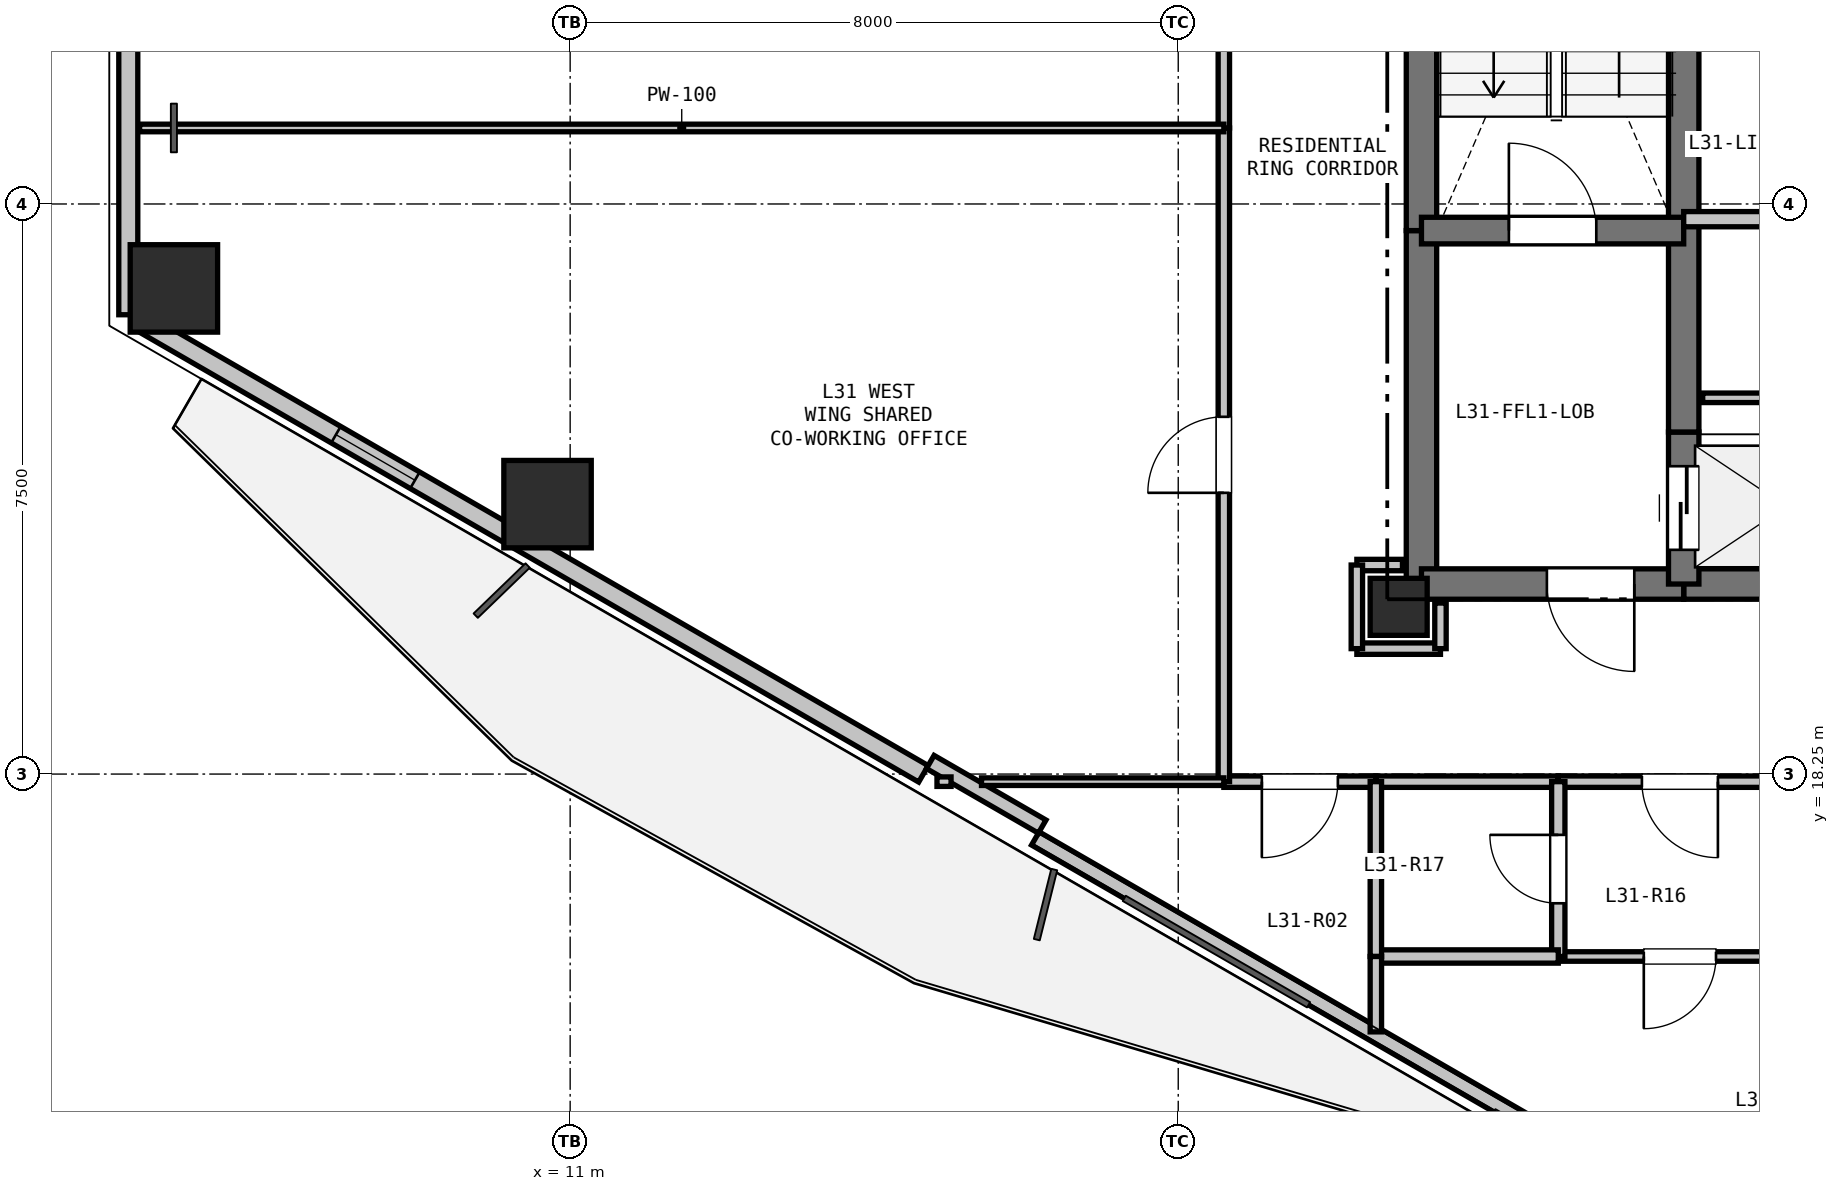
"""IFC4 building model, lengths in metres.
Left out: names, types, materials, properties, quantities, classifications, styles, units other than length and angle.
Written with IfcOpenShell. Run it as: python <this file> out.ifc"""

import sys

from ifc_helpers import new_model, si_unit, direction, frame, frame_2d, origin, origin_2d, place, context, subcontext, project, spatial, rectangle, hollow_rectangle, extrude, element, fill, save


model = new_model("IFC4")
c1 = context("Model", 3, precision=1e-05, world=origin(), true_north=direction((0.0, 1.0)))
c2 = subcontext(c1, "Body", "Model", "MODEL_VIEW")
j1 = project(units=[si_unit("LENGTHUNIT", "METRE"), si_unit("PLANEANGLEUNIT", "RADIAN")], contexts=[c1])
p1 = place(None, origin())
s1 = spatial("IfcSite", under=j1, at=p1, CompositionType="ELEMENT")
p2 = place(p1, origin())
s2 = spatial("IfcBuilding", under=s1, at=p2, CompositionType="ELEMENT")
p3 = place(p2, frame((0.0, 0.0, 113.1)))
s3 = spatial("IfcBuildingStorey", under=s2, at=p3, CompositionType="ELEMENT", Elevation=113.1)
p4 = place(p3, frame((21.9, 20.45, 0.0), z_axis=(0.0, 0.0, 1.0), x_axis=(1.0, 0.0, 0.0)))
e1 = element("IfcColumn", 1, at=p4, inside=s3, PredefinedType="COLUMN", context=c2, shape_type="SweptSolid", body=[
    extrude(rectangle(XDim=0.75, YDim=0.75, at=origin_2d()), origin(), (0.0, 0.0, 1.0), 3.3),
])
for number, where, z_axis, x_axis in (
    (2, (10.702, 21.801, 0.0), (0.0, 0.0, 1.0), (1.0, 0.0, 0.0)),
    (3, (5.787, 24.639, 0.0), (0.0, 0.0, 1.0), (1.0, 0.0, 0.0)),
):
    element("IfcColumn", number, at=place(p3, frame(where, z_axis=z_axis, x_axis=x_axis)), inside=s3, PredefinedType="COLUMN", context=c2, shape_type="SweptSolid", body=[
        extrude(hollow_rectangle(XDim=1.15, YDim=1.15, WallThickness=0.032, at=origin_2d()), origin(), (0.0, 0.0, 1.0), 3.3),
    ])
p5 = place(p3, frame((5.187, 24.293, 0.0), z_axis=(0.0, 0.0, 1.0), x_axis=(0.0, 1.0, 0.0)))
e4 = element("IfcWall", 4, at=p5, inside=s3, PredefinedType="SOLIDWALL", context=c2, shape_type="SweptSolid", body=[
    extrude(rectangle(XDim=4.915, YDim=0.25, at=frame_2d((2.457, 0.0))), origin(), (0.0, 0.0, 1.0), 2.64),
])
p6 = place(p3, frame((26.845, 11.788, 0.0), z_axis=(0.0, 0.0, 1.0), x_axis=(-0.866027010039, 0.499997217876, 0.0)))
e5 = element("IfcWall", 5, at=p6, inside=s3, PredefinedType="PARAPET", context=c2, shape_type="SweptSolid", body=[
    extrude(rectangle(XDim=11.229, YDim=0.2, at=frame_2d((5.615, 0.0))), origin(), (0.0, 0.0, 1.0), 0.2),
])
p7 = place(p3, frame((15.648, 18.253, 0.0), z_axis=(0.0, 0.0, 1.0), x_axis=(-0.866023023012, 0.500004123596, 0.0)))
e6 = element("IfcWall", 6, at=p7, inside=s3, PredefinedType="SOLIDWALL", context=c2, shape_type="SweptSolid", body=[
    extrude(rectangle(XDim=11.93, YDim=0.25, at=frame_2d((5.965, 0.0))), origin(), (0.0, 0.0, 1.0), 2.64),
])
p8 = place(p7, frame((7.725, 0.0, 0.9)))
e7 = element("IfcOpeningElement", 7, at=p8, cuts=e6, PredefinedType="OPENING", context=c2, shape_type="SweptSolid", body=[
    extrude(rectangle(XDim=1.2, YDim=1.5, at=frame_2d((0.6, 0.75))), frame((0.0, 0.135, 0.0), z_axis=(0.0, -1.0, 0.0), x_axis=(1.0, 0.0, 0.0)), (0.0, 0.0, 1.0), 0.27),
])
p9 = place(p3, frame((17.21, 17.559, 0.0), z_axis=(0.0, 0.0, 1.0), x_axis=(-0.866025371046, 0.500000056704, 0.0)))
e8 = element("IfcWall", 8, at=p9, inside=s3, PredefinedType="PARAPET", context=c2, shape_type="SweptSolid", body=[
    extrude(rectangle(XDim=1.7, YDim=0.2, at=frame_2d((0.85, 0.0))), origin(), (0.0, 0.0, 1.0), 2.64),
])
p10 = place(p3, frame((22.2, 20.75, 0.0), z_axis=(0.0, 0.0, 1.0), x_axis=(0.0, 1.0, 0.0)))
e9 = element("IfcWall", 9, at=p10, inside=s3, PredefinedType="SHEAR", context=c2, shape_type="SweptSolid", body=[
    extrude(rectangle(XDim=4.65, YDim=0.4, at=frame_2d((2.325, 0.0))), origin(), (0.0, 0.0, 1.0), 3.02),
])
p11 = place(p3, frame((22.2, 25.4, 0.0), z_axis=(0.0, 0.0, 1.0), x_axis=(0.0, 1.0, 0.0)))
e10 = element("IfcWall", 10, at=p11, inside=s3, PredefinedType="SHEAR", context=c2, shape_type="SweptSolid", body=[
    extrude(rectangle(XDim=7.35, YDim=0.4, at=frame_2d((3.675, 0.0))), origin(), (0.0, 0.0, 1.0), 3.02),
])
p12 = place(p3, frame((28.35, 20.75, 0.0), z_axis=(0.0, 0.0, 1.0), x_axis=(-1.0, 0.0, 0.0)))
e11 = element("IfcWall", 11, at=p12, inside=s3, PredefinedType="SHEAR", context=c2, shape_type="SweptSolid", body=[
    extrude(rectangle(XDim=2.7, YDim=0.4, at=frame_2d((1.35, 0.0))), origin(), (0.0, 0.0, 1.0), 3.02),
])
p13 = place(p3, frame((25.65, 20.75, 0.0), z_axis=(0.0, 0.0, 1.0), x_axis=(-1.0, 0.0, 0.0)))
e12 = element("IfcWall", 12, at=p13, inside=s3, PredefinedType="SHEAR", context=c2, shape_type="SweptSolid", body=[
    extrude(rectangle(XDim=3.45, YDim=0.4, at=frame_2d((1.725, 0.0))), origin(), (0.0, 0.0, 1.0), 3.02),
])
p14 = place(p13, frame((0.65, 0.0, 0.0)))
e13 = element("IfcOpeningElement", 13, at=p14, cuts=e12, PredefinedType="OPENING", context=c2, shape_type="SweptSolid", body=[
    extrude(rectangle(XDim=1.15, YDim=2.15, at=frame_2d((0.575, 1.075))), frame((0.0, 0.21, 0.0), z_axis=(0.0, -1.0, 0.0), x_axis=(1.0, 0.0, 0.0)), (0.0, 0.0, 1.0), 0.42),
])
p15 = place(p3, frame((25.65, 20.75, 0.0), z_axis=(0.0, 0.0, 1.0), x_axis=(0.0, 1.0, 0.0)))
e14 = element("IfcWall", 14, at=p15, inside=s3, PredefinedType="SHEAR", context=c2, shape_type="SweptSolid", body=[
    extrude(rectangle(XDim=2.0, YDim=0.4, at=frame_2d((1.0, 0.0))), origin(), (0.0, 0.0, 1.0), 3.02),
])
p16 = place(p15, frame((0.45, 0.0, 0.0)))
e15 = element("IfcOpeningElement", 15, at=p16, cuts=e14, PredefinedType="OPENING", context=c2, shape_type="SweptSolid", body=[
    extrude(rectangle(XDim=1.1, YDim=2.15, at=frame_2d((0.55, 1.075))), frame((0.0, 0.21, 0.0), z_axis=(0.0, -1.0, 0.0), x_axis=(1.0, 0.0, 0.0)), (0.0, 0.0, 1.0), 0.42),
])
p17 = place(p3, frame((25.65, 22.75, 0.0), z_axis=(0.0, 0.0, 1.0), x_axis=(0.0, 1.0, 0.0)))
e16 = element("IfcWall", 16, at=p17, inside=s3, PredefinedType="SHEAR", context=c2, shape_type="SweptSolid", body=[
    extrude(rectangle(XDim=2.8, YDim=0.4, at=frame_2d((1.4, 0.0))), origin(), (0.0, 0.0, 1.0), 3.02),
])
p18 = place(p3, frame((25.65, 25.55, 0.0), z_axis=(0.0, 0.0, 1.0), x_axis=(0.0, 1.0, 0.0)))
e17 = element("IfcWall", 17, at=p18, inside=s3, PredefinedType="SHEAR", context=c2, shape_type="SweptSolid", body=[
    extrude(rectangle(XDim=2.4, YDim=0.4, at=frame_2d((1.2, 0.0))), origin(), (0.0, 0.0, 1.0), 3.02),
])
p19 = place(p3, frame((22.2, 25.4, 0.0), z_axis=(0.0, 0.0, 1.0), x_axis=(1.0, 0.0, 0.0)))
e18 = element("IfcWall", 18, at=p19, inside=s3, PredefinedType="SHEAR", context=c2, shape_type="SweptSolid", body=[
    extrude(rectangle(XDim=3.45, YDim=0.35, at=frame_2d((1.725, 0.0))), origin(), (0.0, 0.0, 1.0), 3.02),
])
p20 = place(p19, frame((1.15, 0.0, 0.0)))
e19 = element("IfcOpeningElement", 19, at=p20, cuts=e18, PredefinedType="OPENING", context=c2, shape_type="SweptSolid", body=[
    extrude(rectangle(XDim=1.15, YDim=2.15, at=frame_2d((0.575, 1.075))), frame((0.0, 0.185, 0.0), z_axis=(0.0, -1.0, 0.0), x_axis=(1.0, 0.0, 0.0)), (0.0, 0.0, 1.0), 0.37),
])
p21 = place(p3, frame((25.65, 25.55, 0.0), z_axis=(0.0, 0.0, 1.0), x_axis=(1.0, 0.0, 0.0)))
e20 = element("IfcWall", 20, at=p21, inside=s3, PredefinedType="PARTITIONING", context=c2, shape_type="SweptSolid", body=[
    extrude(rectangle(XDim=4.95, YDim=0.2, at=frame_2d((2.475, 0.0))), origin(), (0.0, 0.0, 1.0), 3.02),
])
p22 = place(p3, frame((25.9, 23.2, 0.0), z_axis=(0.0, 0.0, 1.0), x_axis=(1.0, 0.0, 0.0)))
e21 = element("IfcWall", 21, at=p22, inside=s3, PredefinedType="PARTITIONING", context=c2, shape_type="SweptSolid", body=[
    extrude(rectangle(XDim=1.4, YDim=0.125, at=frame_2d((0.7, 0.0))), origin(), (0.0, 0.0, 1.0), 3.02),
])
p23 = place(p3, frame((21.35, 19.9, 0.0), z_axis=(0.0, 0.0, 1.0), x_axis=(1.0, 0.0, 0.0)))
e22 = element("IfcWall", 22, at=p23, inside=s3, PredefinedType="PARTITIONING", context=c2, shape_type="SweptSolid", body=[
    extrude(rectangle(XDim=1.1, YDim=0.15, at=frame_2d((0.55, 0.0))), origin(), (0.0, 0.0, 1.0), 2.393),
])
p24 = place(p3, frame((22.45, 19.9, 0.0), z_axis=(0.0, 0.0, 1.0), x_axis=(0.0, 1.0, 0.0)))
e23 = element("IfcWall", 23, at=p24, inside=s3, PredefinedType="PARTITIONING", context=c2, shape_type="SweptSolid", body=[
    extrude(rectangle(XDim=0.6, YDim=0.15, at=frame_2d((0.3, 0.0))), origin(), (0.0, 0.0, 1.0), 2.393),
])
p25 = place(p3, frame((27.2, 18.15, 0.0), z_axis=(0.0, 0.0, 1.0), x_axis=(-1.0, 0.0, 0.0)))
e24 = element("IfcWall", 24, at=p25, inside=s3, PredefinedType="PARTITIONING", context=c2, shape_type="SweptSolid", body=[
    extrude(rectangle(XDim=3.2, YDim=0.15, at=frame_2d((1.6, 0.0))), origin(), (0.0, 0.0, 1.0), 2.393),
])
p26 = place(p25, frame((1.1, 0.0, 0.0)))
e25 = element("IfcOpeningElement", 25, at=p26, cuts=e24, PredefinedType="OPENING", context=c2, shape_type="SweptSolid", body=[
    extrude(rectangle(XDim=1.0, YDim=2.15, at=frame_2d((0.5, 1.075))), frame((0.0, 0.085, 0.0), z_axis=(0.0, -1.0, 0.0), x_axis=(1.0, 0.0, 0.0)), (0.0, 0.0, 1.0), 0.17),
])
p27 = place(p3, frame((24.0, 18.15, 0.0), z_axis=(0.0, 0.0, 1.0), x_axis=(-1.0, 0.0, 0.0)))
e26 = element("IfcWall", 26, at=p27, inside=s3, PredefinedType="PARTITIONING", context=c2, shape_type="SweptSolid", body=[
    extrude(rectangle(XDim=2.4, YDim=0.15, at=frame_2d((1.2, 0.0))), origin(), (0.0, 0.0, 1.0), 2.393),
])
p28 = place(p3, frame((21.6, 18.15, 0.0), z_axis=(0.0, 0.0, 1.0), x_axis=(-1.0, 0.0, 0.0)))
e27 = element("IfcWall", 27, at=p28, inside=s3, PredefinedType="PARTITIONING", context=c2, shape_type="SweptSolid", body=[
    extrude(rectangle(XDim=2.0, YDim=0.15, at=frame_2d((1.0, 0.0))), origin(), (0.0, 0.0, 1.0), 3.02),
])
p29 = place(p28, frame((0.5, 0.0, 0.0)))
e28 = element("IfcOpeningElement", 28, at=p29, cuts=e27, PredefinedType="OPENING", context=c2, shape_type="SweptSolid", body=[
    extrude(rectangle(XDim=1.0, YDim=2.15, at=frame_2d((0.5, 1.075))), frame((0.0, 0.085, 0.0), z_axis=(0.0, -1.0, 0.0), x_axis=(1.0, 0.0, 0.0)), (0.0, 0.0, 1.0), 0.17),
])
p30 = place(p3, frame((19.6, 18.15, 0.0), z_axis=(0.0, 0.0, 1.0), x_axis=(0.0, 1.0, 0.0)))
e29 = element("IfcWall", 29, at=p30, inside=s3, PredefinedType="PARTITIONING", context=c2, shape_type="SweptSolid", body=[
    extrude(rectangle(XDim=8.6, YDim=0.15, at=frame_2d((4.3, 0.0))), origin(), (0.0, 0.0, 1.0), 2.393),
])
p31 = place(p30, frame((3.8, 0.0, 0.0)))
e30 = element("IfcOpeningElement", 30, at=p31, cuts=e29, PredefinedType="OPENING", context=c2, shape_type="SweptSolid", body=[
    extrude(rectangle(XDim=1.0, YDim=2.15, at=frame_2d((0.5, 1.075))), frame((0.0, 0.085, 0.0), z_axis=(0.0, -1.0, 0.0), x_axis=(1.0, 0.0, 0.0)), (0.0, 0.0, 1.0), 0.17),
])
p32 = place(p3, frame((19.6, 26.75, 0.0), z_axis=(0.0, 0.0, 1.0), x_axis=(0.0, 1.0, 0.0)))
e31 = element("IfcWall", 31, at=p32, inside=s3, PredefinedType="PARTITIONING", context=c2, shape_type="SweptSolid", body=[
    extrude(rectangle(XDim=8.6, YDim=0.15, at=frame_2d((4.3, 0.0))), origin(), (0.0, 0.0, 1.0), 2.393),
])
p33 = place(p32, frame((3.4, 0.0, 0.0)))
e32 = element("IfcOpeningElement", 32, at=p33, cuts=e31, PredefinedType="OPENING", context=c2, shape_type="SweptSolid", body=[
    extrude(rectangle(XDim=1.8, YDim=2.2, at=frame_2d((0.9, 1.1))), frame((0.0, 0.085, 0.0), z_axis=(0.0, -1.0, 0.0), x_axis=(1.0, 0.0, 0.0)), (0.0, 0.0, 1.0), 0.17),
])
p34 = place(p3, frame((21.95, 21.0, 0.0), z_axis=(0.0, 0.0, 1.0), x_axis=(-1.0, 0.0, 0.0)))
e33 = element("IfcWall", 33, at=p34, inside=s3, PredefinedType="PARTITIONING", context=c2, shape_type="SweptSolid", body=[
    extrude(rectangle(XDim=0.6, YDim=0.15, at=frame_2d((0.3, 0.0))), origin(), (0.0, 0.0, 1.0), 2.468),
])
p35 = place(p3, frame((21.35, 21.0, 0.0), z_axis=(0.0, 0.0, 1.0), x_axis=(0.0, -1.0, 0.0)))
e34 = element("IfcWall", 34, at=p35, inside=s3, PredefinedType="PARTITIONING", context=c2, shape_type="SweptSolid", body=[
    extrude(rectangle(XDim=1.1, YDim=0.15, at=frame_2d((0.55, 0.0))), origin(), (0.0, 0.0, 1.0), 2.393),
])
p36 = place(p3, frame((27.2, 15.85, 0.0), z_axis=(0.0, 0.0, 1.0), x_axis=(-1.0, 0.0, 0.0)))
e35 = element("IfcWall", 35, at=p36, inside=s3, PredefinedType="PARTITIONING", context=c2, shape_type="SweptSolid", body=[
    extrude(rectangle(XDim=3.2, YDim=0.125, at=frame_2d((1.6, 0.0))), origin(), (0.0, 0.0, 1.0), 2.393),
])
p37 = place(p36, frame((1.125, 0.0, 0.0)))
e36 = element("IfcOpeningElement", 36, at=p37, cuts=e35, PredefinedType="OPENING", context=c2, shape_type="SweptSolid", body=[
    extrude(rectangle(XDim=0.95, YDim=2.1, at=frame_2d((0.475, 1.05))), frame((0.0, 0.073, 0.0), z_axis=(0.0, -1.0, 0.0), x_axis=(1.0, 0.0, 0.0)), (0.0, 0.0, 1.0), 0.145),
])
p38 = place(p3, frame((24.0, 15.85, 0.0), z_axis=(0.0, 0.0, 1.0), x_axis=(0.0, 1.0, 0.0)))
e37 = element("IfcWall", 37, at=p38, inside=s3, PredefinedType="PLUMBINGWALL", context=c2, shape_type="SweptSolid", body=[
    extrude(rectangle(XDim=2.3, YDim=0.175, at=frame_2d((1.15, 0.0))), origin(), (0.0, 0.0, 1.0), 2.393),
])
p39 = place(p38, frame((0.7, 0.0, 0.0)))
e38 = element("IfcOpeningElement", 38, at=p39, cuts=e37, PredefinedType="OPENING", context=c2, shape_type="SweptSolid", body=[
    extrude(rectangle(XDim=0.9, YDim=2.1, at=frame_2d((0.45, 1.05))), frame((0.0, 0.097, 0.0), z_axis=(0.0, -1.0, 0.0), x_axis=(1.0, 0.0, 0.0)), (0.0, 0.0, 1.0), 0.195),
])
p40 = place(p3, frame((24.0, 15.85, 0.0), z_axis=(0.0, 0.0, 1.0), x_axis=(-1.0, 0.0, 0.0)))
e39 = element("IfcWall", 39, at=p40, inside=s3, PredefinedType="PLUMBINGWALL", context=c2, shape_type="SweptSolid", body=[
    extrude(rectangle(XDim=2.4, YDim=0.175, at=frame_2d((1.2, 0.0))), origin(), (0.0, 0.0, 1.0), 3.02),
])
p41 = place(p3, frame((21.6, 15.85, 0.0), z_axis=(0.0, 0.0, 1.0), x_axis=(0.0, 1.0, 0.0)))
e40 = element("IfcWall", 40, at=p41, inside=s3, PredefinedType="PARTITIONING", context=c2, shape_type="SweptSolid", body=[
    extrude(rectangle(XDim=2.3, YDim=0.15, at=frame_2d((1.15, 0.0))), origin(), (0.0, 0.0, 1.0), 3.02),
])
p42 = place(p3, frame((15.826, 18.15, 0.0), z_axis=(0.0, 0.0, 1.0), x_axis=(1.0, 0.0, 0.0)))
e41 = element("IfcWall", 41, at=p42, inside=s3, PredefinedType="PARTITIONING", context=c2, shape_type="SweptSolid", body=[
    extrude(rectangle(XDim=0.185, YDim=0.125, at=frame_2d((0.093, 0.0))), origin(), (0.0, 0.0, 1.0), 3.02),
])
p43 = place(p3, frame((16.412, 18.15, 0.0), z_axis=(0.0, 0.0, 1.0), x_axis=(1.0, 0.0, 0.0)))
e42 = element("IfcWall", 42, at=p43, inside=s3, PredefinedType="PARTITIONING", context=c2, shape_type="SweptSolid", body=[
    extrude(rectangle(XDim=3.188, YDim=0.1, at=frame_2d((1.594, 0.0))), origin(), (0.0, 0.0, 1.0), 2.365),
])
p44 = place(p3, frame((21.6, 15.85, 0.0), z_axis=(0.0, 0.0, 1.0), x_axis=(0.0, -1.0, 0.0)))
e43 = element("IfcWall", 43, at=p44, inside=s3, PredefinedType="PARTITIONING", context=c2, shape_type="SweptSolid", body=[
    extrude(rectangle(XDim=0.992, YDim=0.15, at=frame_2d((0.496, 0.0))), origin(), (0.0, 0.0, 1.0), 2.365),
])
p45 = place(p3, frame((5.336, 26.75, 0.0), z_axis=(0.0, 0.0, 1.0), x_axis=(1.0, 0.0, 0.0)))
e44 = element("IfcWall", 44, at=p45, inside=s3, PredefinedType="PARTITIONING", context=c2, shape_type="SweptSolid", body=[
    extrude(rectangle(XDim=14.264, YDim=0.1, at=frame_2d((7.132, 0.0))), origin(), (0.0, 0.0, 1.0), 2.684),
])
p46 = place(p8, origin())
e45 = element("IfcWindow", 45, at=p46, inside=s3, PartitioningType="SINGLE_PANEL", PredefinedType="WINDOW", context=c2, shape_type="SweptSolid", body=[
    extrude(rectangle(XDim=1.2, YDim=1.5, at=frame_2d((0.6, 0.75))), frame((0.0, 0.03, 0.0), z_axis=(0.0, -1.0, 0.0), x_axis=(1.0, 0.0, 0.0)), (0.0, 0.0, 1.0), 0.06),
])
fill(e7, e45)
p47 = place(p16, origin())
e46 = element("IfcDoor", 46, at=p47, inside=s3, OperationType="SLIDING_TO_LEFT", PredefinedType="DOOR", context=c2, shape_type="SweptSolid", body=[
    extrude(rectangle(XDim=1.1, YDim=2.15, at=frame_2d((0.55, 1.075))), frame((0.0, 0.025, 0.0), z_axis=(0.0, -1.0, 0.0), x_axis=(1.0, 0.0, 0.0)), (0.0, 0.0, 1.0), 0.05),
])
fill(e15, e46)
p48 = place(p20, origin())
e47 = element("IfcDoor", 47, at=p48, inside=s3, OperationType="SINGLE_SWING_LEFT", PredefinedType="DOOR", context=c2, shape_type="SweptSolid", body=[
    extrude(rectangle(XDim=1.15, YDim=2.15, at=frame_2d((0.575, 1.075))), frame((0.0, 0.025, 0.0), z_axis=(0.0, -1.0, 0.0), x_axis=(1.0, 0.0, 0.0)), (0.0, 0.0, 1.0), 0.05),
])
fill(e19, e47)
p49 = place(p14, origin())
e48 = element("IfcDoor", 48, at=p49, inside=s3, OperationType="SINGLE_SWING_LEFT", PredefinedType="DOOR", context=c2, shape_type="SweptSolid", body=[
    extrude(rectangle(XDim=1.15, YDim=2.15, at=frame_2d((0.575, 1.075))), frame((0.0, 0.025, 0.0), z_axis=(0.0, -1.0, 0.0), x_axis=(1.0, 0.0, 0.0)), (0.0, 0.0, 1.0), 0.05),
])
fill(e13, e48)
p50 = place(p26, origin())
e49 = element("IfcDoor", 49, at=p50, inside=s3, OperationType="SINGLE_SWING_LEFT", PredefinedType="DOOR", context=c2, shape_type="SweptSolid", body=[
    extrude(rectangle(XDim=1.0, YDim=2.15, at=frame_2d((0.5, 1.075))), frame((0.0, 0.025, 0.0), z_axis=(0.0, -1.0, 0.0), x_axis=(1.0, 0.0, 0.0)), (0.0, 0.0, 1.0), 0.05),
])
fill(e25, e49)
p51 = place(p29, origin())
e50 = element("IfcDoor", 50, at=p51, inside=s3, OperationType="SINGLE_SWING_RIGHT", PredefinedType="DOOR", context=c2, shape_type="SweptSolid", body=[
    extrude(rectangle(XDim=1.0, YDim=2.15, at=frame_2d((0.5, 1.075))), frame((0.0, 0.025, 0.0), z_axis=(0.0, -1.0, 0.0), x_axis=(1.0, 0.0, 0.0)), (0.0, 0.0, 1.0), 0.05),
])
fill(e28, e50)
p52 = place(p31, origin())
e51 = element("IfcDoor", 51, at=p52, inside=s3, OperationType="SINGLE_SWING_LEFT", PredefinedType="DOOR", context=c2, shape_type="SweptSolid", body=[
    extrude(rectangle(XDim=1.0, YDim=2.15, at=frame_2d((0.5, 1.075))), frame((0.0, 0.025, 0.0), z_axis=(0.0, -1.0, 0.0), x_axis=(1.0, 0.0, 0.0)), (0.0, 0.0, 1.0), 0.05),
])
fill(e30, e51)
p53 = place(p39, origin())
e52 = element("IfcDoor", 52, at=p53, inside=s3, OperationType="SINGLE_SWING_RIGHT", PredefinedType="DOOR", context=c2, shape_type="SweptSolid", body=[
    extrude(rectangle(XDim=0.9, YDim=2.1, at=frame_2d((0.45, 1.05))), frame((0.0, 0.025, 0.0), z_axis=(0.0, -1.0, 0.0), x_axis=(1.0, 0.0, 0.0)), (0.0, 0.0, 1.0), 0.05),
])
fill(e38, e52)
p54 = place(p37, origin())
e53 = element("IfcDoor", 53, at=p54, inside=s3, OperationType="SINGLE_SWING_RIGHT", PredefinedType="DOOR", context=c2, shape_type="SweptSolid", body=[
    extrude(rectangle(XDim=0.95, YDim=2.1, at=frame_2d((0.475, 1.05))), frame((0.0, 0.025, 0.0), z_axis=(0.0, -1.0, 0.0), x_axis=(1.0, 0.0, 0.0)), (0.0, 0.0, 1.0), 0.05),
])
fill(e36, e53)
save(model, sys.argv[1])
